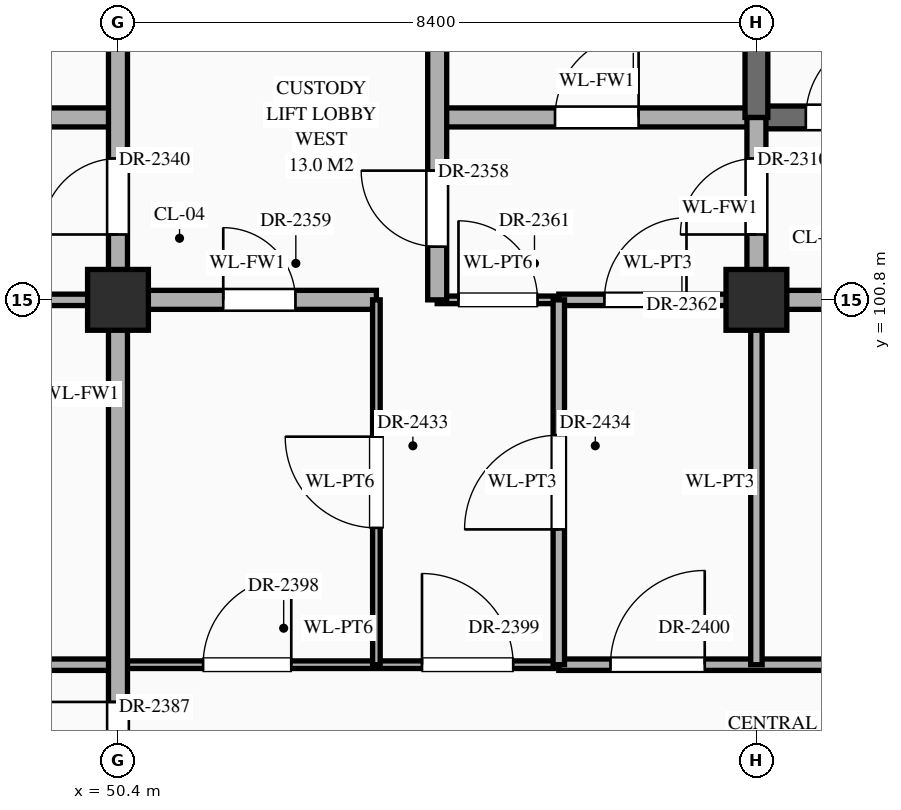
"""IFC4 building model, lengths in metres.
Left out: names, types, materials, properties, quantities, classifications, styles, units other than length and angle.
Written with IfcOpenShell. Run it as: python <this file> out.ifc"""

import sys

from ifc_helpers import new_model, si_unit, direction, frame, frame_2d, origin, origin_2d, place, context, subcontext, project, spatial, rectangle, extrude, element, fill, save


model = new_model("IFC4")
c1 = context("Model", 3, precision=1e-05, world=origin(), true_north=direction((0.0, 1.0)))
c2 = subcontext(c1, "Body", "Model", "MODEL_VIEW")
j1 = project(units=[si_unit("LENGTHUNIT", "METRE"), si_unit("PLANEANGLEUNIT", "RADIAN")], contexts=[c1])
p1 = place(None, origin())
s1 = spatial("IfcSite", under=j1, at=p1, CompositionType="ELEMENT")
p2 = place(p1, origin())
s2 = spatial("IfcBuilding", under=s1, at=p2, CompositionType="ELEMENT")
p3 = place(p2, frame((0.0, 0.0, 30.6)))
s3 = spatial("IfcBuildingStorey", under=s2, at=p3, CompositionType="ELEMENT", Elevation=30.6)
for number, where, z_axis, x_axis in (
    (1, (50.4, 100.8, 0.0), (0.0, 0.0, 1.0), (1.0, 0.0, 0.0)),
    (2, (58.8, 100.8, 0.0), (0.0, 0.0, 1.0), (1.0, 0.0, 0.0)),
):
    element("IfcColumn", number, at=place(p3, frame(where, z_axis=z_axis, x_axis=x_axis)), inside=s3, PredefinedType="COLUMN", context=c2, shape_type="SweptSolid", body=[
        extrude(rectangle(XDim=0.8, YDim=0.8, at=origin_2d()), origin(), (0.0, 0.0, 1.0), 4.5),
    ])
p4 = place(p3, frame((31.0, 96.0, 0.0), z_axis=(0.0, 0.0, 1.0), x_axis=(1.0, 0.0, 0.0)))
e3 = element("IfcWall", 3, at=p4, inside=s3, PredefinedType="STANDARD", context=c2, shape_type="SweptSolid", body=[
    extrude(rectangle(XDim=19.4, YDim=0.15, at=frame_2d((9.7, 0.0))), origin(), (0.0, 0.0, 1.0), 4.15),
])
p5 = place(p4, frame((0.85, 0.0, 0.0)))
e4 = element("IfcOpeningElement", 4, at=p5, cuts=e3, PredefinedType="OPENING", context=c2, shape_type="SweptSolid", body=[
    extrude(rectangle(XDim=0.9, YDim=2.15, at=frame_2d((0.45, 1.075))), frame((0.0, 0.087, 0.0), z_axis=(0.0, -1.0, 0.0), x_axis=(1.0, 0.0, 0.0)), (0.0, 0.0, 1.0), 0.174),
])
p6 = place(p4, frame((6.37, 0.0, 0.0)))
e5 = element("IfcOpeningElement", 5, at=p6, cuts=e3, PredefinedType="OPENING", context=c2, shape_type="SweptSolid", body=[
    extrude(rectangle(XDim=0.86, YDim=2.1, at=frame_2d((0.43, 1.05))), frame((0.0, 0.087, 0.0), z_axis=(0.0, -1.0, 0.0), x_axis=(1.0, 0.0, 0.0)), (0.0, 0.0, 1.0), 0.174),
])
p7 = place(p4, frame((14.74, 0.0, 0.0)))
e6 = element("IfcOpeningElement", 6, at=p7, cuts=e3, PredefinedType="OPENING", context=c2, shape_type="SweptSolid", body=[
    extrude(rectangle(XDim=0.92, YDim=2.15, at=frame_2d((0.46, 1.075))), frame((0.0, 0.087, 0.0), z_axis=(0.0, -1.0, 0.0), x_axis=(1.0, 0.0, 0.0)), (0.0, 0.0, 1.0), 0.174),
])
p8 = place(p3, frame((50.4, 96.0, 0.0), z_axis=(0.0, 0.0, 1.0), x_axis=(1.0, 0.0, 0.0)))
e7 = element("IfcWall", 7, at=p8, inside=s3, PredefinedType="STANDARD", context=c2, shape_type="SweptSolid", body=[
    extrude(rectangle(XDim=5.8, YDim=0.1, at=frame_2d((2.9, 0.0))), origin(), (0.0, 0.0, 1.0), 4.24),
])
p9 = place(p8, frame((1.12, 0.0, 0.0)))
e8 = element("IfcOpeningElement", 8, at=p9, cuts=e7, PredefinedType="OPENING", context=c2, shape_type="SweptSolid", body=[
    extrude(rectangle(XDim=1.16, YDim=2.3, at=frame_2d((0.58, 1.15))), frame((0.0, 0.062, 0.0), z_axis=(0.0, -1.0, 0.0), x_axis=(1.0, 0.0, 0.0)), (0.0, 0.0, 1.0), 0.124),
])
p10 = place(p8, frame((4.0, 0.0, 0.0)))
e9 = element("IfcOpeningElement", 9, at=p10, cuts=e7, PredefinedType="OPENING", context=c2, shape_type="SweptSolid", body=[
    extrude(rectangle(XDim=1.2, YDim=2.35, at=frame_2d((0.6, 1.175))), frame((0.0, 0.062, 0.0), z_axis=(0.0, -1.0, 0.0), x_axis=(1.0, 0.0, 0.0)), (0.0, 0.0, 1.0), 0.124),
])
p11 = place(p3, frame((56.2, 96.0, 0.0), z_axis=(0.0, 0.0, 1.0), x_axis=(1.0, 0.0, 0.0)))
e10 = element("IfcWall", 10, at=p11, inside=s3, PredefinedType="STANDARD", context=c2, shape_type="SweptSolid", body=[
    extrude(rectangle(XDim=27.8, YDim=0.15, at=frame_2d((13.9, 0.0))), origin(), (0.0, 0.0, 1.0), 4.24),
])
p12 = place(p11, frame((0.68, 0.0, 0.0)))
e11 = element("IfcOpeningElement", 11, at=p12, cuts=e10, PredefinedType="OPENING", context=c2, shape_type="SweptSolid", body=[
    extrude(rectangle(XDim=1.24, YDim=2.3, at=frame_2d((0.62, 1.15))), frame((0.0, 0.087, 0.0), z_axis=(0.0, -1.0, 0.0), x_axis=(1.0, 0.0, 0.0)), (0.0, 0.0, 1.0), 0.174),
])
p13 = place(p11, frame((6.16, 0.0, 0.0)))
e12 = element("IfcOpeningElement", 12, at=p13, cuts=e10, PredefinedType="OPENING", context=c2, shape_type="SweptSolid", body=[
    extrude(rectangle(XDim=1.28, YDim=2.35, at=frame_2d((0.64, 1.175))), frame((0.0, 0.087, 0.0), z_axis=(0.0, -1.0, 0.0), x_axis=(1.0, 0.0, 0.0)), (0.0, 0.0, 1.0), 0.174),
])
p14 = place(p11, frame((14.73, 0.0, 0.0)))
e13 = element("IfcOpeningElement", 13, at=p14, cuts=e10, PredefinedType="OPENING", context=c2, shape_type="SweptSolid", body=[
    extrude(rectangle(XDim=0.94, YDim=2.3, at=frame_2d((0.47, 1.15))), frame((0.0, 0.087, 0.0), z_axis=(0.0, -1.0, 0.0), x_axis=(1.0, 0.0, 0.0)), (0.0, 0.0, 1.0), 0.174),
])
p15 = place(p11, frame((23.11, 0.0, 0.0)))
e14 = element("IfcOpeningElement", 14, at=p15, cuts=e10, PredefinedType="OPENING", context=c2, shape_type="SweptSolid", body=[
    extrude(rectangle(XDim=0.98, YDim=2.35, at=frame_2d((0.49, 1.175))), frame((0.0, 0.087, 0.0), z_axis=(0.0, -1.0, 0.0), x_axis=(1.0, 0.0, 0.0)), (0.0, 0.0, 1.0), 0.174),
])
p16 = place(p3, frame((46.2, 100.8, 0.0), z_axis=(0.0, 0.0, 1.0), x_axis=(1.0, 0.0, 0.0)))
e15 = element("IfcWall", 15, at=p16, inside=s3, PredefinedType="STANDARD", context=c2, shape_type="SweptSolid", body=[
    extrude(rectangle(XDim=4.2, YDim=0.15, at=frame_2d((2.1, 0.0))), origin(), (0.0, 0.0, 1.0), 3.39),
])
p17 = place(p16, frame((1.48, 0.0, 0.0)))
e16 = element("IfcOpeningElement", 16, at=p17, cuts=e15, PredefinedType="OPENING", context=c2, shape_type="SweptSolid", body=[
    extrude(rectangle(XDim=0.92, YDim=2.15, at=frame_2d((0.46, 1.075))), frame((0.0, 0.087, 0.0), z_axis=(0.0, -1.0, 0.0), x_axis=(1.0, 0.0, 0.0)), (0.0, 0.0, 1.0), 0.174),
])
p18 = place(p3, frame((50.4, 100.8, 0.0), z_axis=(0.0, 0.0, 1.0), x_axis=(1.0, 0.0, 0.0)))
e17 = element("IfcWall", 17, at=p18, inside=s3, PredefinedType="STANDARD", context=c2, shape_type="SweptSolid", body=[
    extrude(rectangle(XDim=3.4, YDim=0.25, at=frame_2d((1.7, 0.0))), origin(), (0.0, 0.0, 1.0), 3.39),
])
p19 = place(p18, frame((1.385, 0.0, 0.0)))
e18 = element("IfcOpeningElement", 18, at=p19, cuts=e17, PredefinedType="OPENING", context=c2, shape_type="SweptSolid", body=[
    extrude(rectangle(XDim=0.95, YDim=2.15, at=frame_2d((0.475, 1.075))), frame((0.0, 0.137, 0.0), z_axis=(0.0, -1.0, 0.0), x_axis=(1.0, 0.0, 0.0)), (0.0, 0.0, 1.0), 0.274),
])
p20 = place(p3, frame((54.6, 100.8, 0.0), z_axis=(0.0, 0.0, 1.0), x_axis=(1.0, 0.0, 0.0)))
e19 = element("IfcWall", 19, at=p20, inside=s3, PredefinedType="STANDARD", context=c2, shape_type="SweptSolid", body=[
    extrude(rectangle(XDim=1.6, YDim=0.1, at=frame_2d((0.8, 0.0))), origin(), (0.0, 0.0, 1.0), 3.39),
])
p21 = place(p20, frame((0.28, 0.0, 0.0)))
e20 = element("IfcOpeningElement", 20, at=p21, cuts=e19, PredefinedType="OPENING", context=c2, shape_type="SweptSolid", body=[
    extrude(rectangle(XDim=1.04, YDim=2.2, at=frame_2d((0.52, 1.1))), frame((0.0, 0.062, 0.0), z_axis=(0.0, -1.0, 0.0), x_axis=(1.0, 0.0, 0.0)), (0.0, 0.0, 1.0), 0.124),
])
p22 = place(p3, frame((56.2, 100.8, 0.0), z_axis=(0.0, 0.0, 1.0), x_axis=(1.0, 0.0, 0.0)))
e21 = element("IfcWall", 21, at=p22, inside=s3, PredefinedType="STANDARD", context=c2, shape_type="SweptSolid", body=[
    extrude(rectangle(XDim=2.6, YDim=0.15, at=frame_2d((1.3, 0.0))), origin(), (0.0, 0.0, 1.0), 3.39),
])
p23 = place(p22, frame((0.6, 0.0, 0.0)))
e22 = element("IfcOpeningElement", 22, at=p23, cuts=e21, PredefinedType="OPENING", context=c2, shape_type="SweptSolid", body=[
    extrude(rectangle(XDim=1.08, YDim=2.25, at=frame_2d((0.54, 1.125))), frame((0.0, 0.087, 0.0), z_axis=(0.0, -1.0, 0.0), x_axis=(1.0, 0.0, 0.0)), (0.0, 0.0, 1.0), 0.174),
])
p24 = place(p3, frame((58.8, 100.8, 0.0), z_axis=(0.0, 0.0, 1.0), x_axis=(1.0, 0.0, 0.0)))
e23 = element("IfcWall", 23, at=p24, inside=s3, PredefinedType="STANDARD", context=c2, shape_type="SweptSolid", body=[
    extrude(rectangle(XDim=12.6, YDim=0.25, at=frame_2d((6.3, 0.0))), origin(), (0.0, 0.0, 1.0), 3.39),
])
p25 = place(p24, frame((3.725, 0.0, 0.0)))
e24 = element("IfcOpeningElement", 24, at=p25, cuts=e23, PredefinedType="OPENING", context=c2, shape_type="SweptSolid", body=[
    extrude(rectangle(XDim=0.95, YDim=2.15, at=frame_2d((0.475, 1.075))), frame((0.0, 0.137, 0.0), z_axis=(0.0, -1.0, 0.0), x_axis=(1.0, 0.0, 0.0)), (0.0, 0.0, 1.0), 0.274),
])
p26 = place(p3, frame((46.2, 103.2, 0.0), z_axis=(0.0, 0.0, 1.0), x_axis=(1.0, 0.0, 0.0)))
e25 = element("IfcWall", 25, at=p26, inside=s3, PredefinedType="STANDARD", context=c2, shape_type="SweptSolid", body=[
    extrude(rectangle(XDim=4.2, YDim=0.25, at=frame_2d((2.1, 0.0))), origin(), (0.0, 0.0, 1.0), 4.24),
])
p27 = place(p26, frame((1.55, 0.0, 0.0)))
e26 = element("IfcOpeningElement", 26, at=p27, cuts=e25, PredefinedType="OPENING", context=c2, shape_type="SweptSolid", body=[
    extrude(rectangle(XDim=1.1, YDim=2.2, at=frame_2d((0.55, 1.1))), frame((0.0, 0.137, 0.0), z_axis=(0.0, -1.0, 0.0), x_axis=(1.0, 0.0, 0.0)), (0.0, 0.0, 1.0), 0.274),
])
p28 = place(p3, frame((54.6, 103.2, 0.0), z_axis=(0.0, 0.0, 1.0), x_axis=(1.0, 0.0, 0.0)))
e27 = element("IfcWall", 27, at=p28, inside=s3, PredefinedType="STANDARD", context=c2, shape_type="SweptSolid", body=[
    extrude(rectangle(XDim=4.2, YDim=0.25, at=frame_2d((2.1, 0.0))), origin(), (0.0, 0.0, 1.0), 4.24),
])
p29 = place(p28, frame((1.55, 0.0, 0.0)))
e28 = element("IfcOpeningElement", 28, at=p29, cuts=e27, PredefinedType="OPENING", context=c2, shape_type="SweptSolid", body=[
    extrude(rectangle(XDim=1.1, YDim=2.2, at=frame_2d((0.55, 1.1))), frame((0.0, 0.137, 0.0), z_axis=(0.0, -1.0, 0.0), x_axis=(1.0, 0.0, 0.0)), (0.0, 0.0, 1.0), 0.274),
])
p30 = place(p3, frame((58.8, 103.2, 0.0), z_axis=(0.0, 0.0, 1.0), x_axis=(1.0, 0.0, 0.0)))
e29 = element("IfcWall", 29, at=p30, inside=s3, PredefinedType="SHEAR", context=c2, shape_type="SweptSolid", body=[
    extrude(rectangle(XDim=8.4, YDim=0.3, at=frame_2d((4.2, 0.0))), origin(), (0.0, 0.0, 1.0), 4.24),
])
p31 = place(p30, frame((0.65, 0.0, 0.0)))
e30 = element("IfcOpeningElement", 30, at=p31, cuts=e29, PredefinedType="OPENING", context=c2, shape_type="SweptSolid", body=[
    extrude(rectangle(XDim=1.1, YDim=2.2, at=frame_2d((0.55, 1.1))), frame((0.0, 0.162, 0.0), z_axis=(0.0, -1.0, 0.0), x_axis=(1.0, 0.0, 0.0)), (0.0, 0.0, 1.0), 0.324),
])
p32 = place(p3, frame((50.4, 91.2, 0.0), z_axis=(0.0, 0.0, 1.0), x_axis=(0.0, 1.0, 0.0)))
e31 = element("IfcWall", 31, at=p32, inside=s3, PredefinedType="STANDARD", context=c2, shape_type="SweptSolid", body=[
    extrude(rectangle(XDim=13.2, YDim=0.25, at=frame_2d((6.6, 0.0))), origin(), (0.0, 0.0, 1.0), 3.49),
])
p33 = place(p32, frame((0.565, 0.0, 0.0)))
e32 = element("IfcOpeningElement", 32, at=p33, cuts=e31, PredefinedType="OPENING", context=c2, shape_type="SweptSolid", body=[
    extrude(rectangle(XDim=0.95, YDim=2.15, at=frame_2d((0.475, 1.075))), frame((0.0, 0.137, 0.0), z_axis=(0.0, -1.0, 0.0), x_axis=(1.0, 0.0, 0.0)), (0.0, 0.0, 1.0), 0.274),
])
p34 = place(p32, frame((10.46, 0.0, 0.0)))
e33 = element("IfcOpeningElement", 33, at=p34, cuts=e31, PredefinedType="OPENING", context=c2, shape_type="SweptSolid", body=[
    extrude(rectangle(XDim=1.0, YDim=2.2, at=frame_2d((0.5, 1.1))), frame((0.0, 0.137, 0.0), z_axis=(0.0, -1.0, 0.0), x_axis=(1.0, 0.0, 0.0)), (0.0, 0.0, 1.0), 0.274),
])
p35 = place(p32, frame((3.21, 0.0, 0.0)))
e34 = element("IfcOpeningElement", 34, at=p35, cuts=e31, PredefinedType="OPENING", context=c2, shape_type="SweptSolid", body=[
    extrude(rectangle(XDim=1.1, YDim=2.2, at=frame_2d((0.55, 1.1))), frame((0.0, 0.137, 0.0), z_axis=(0.0, -1.0, 0.0), x_axis=(1.0, 0.0, 0.0)), (0.0, 0.0, 1.0), 0.274),
])
p36 = place(p3, frame((53.8, 96.0, 0.0), z_axis=(0.0, 0.0, 1.0), x_axis=(0.0, 1.0, 0.0)))
e35 = element("IfcWall", 35, at=p36, inside=s3, PredefinedType="STANDARD", context=c2, shape_type="SweptSolid", body=[
    extrude(rectangle(XDim=4.8, YDim=0.1, at=frame_2d((2.4, 0.0))), origin(), (0.0, 0.0, 1.0), 4.24),
])
p37 = place(p36, frame((1.8, 0.0, 0.0)))
e36 = element("IfcOpeningElement", 36, at=p37, cuts=e35, PredefinedType="OPENING", context=c2, shape_type="SweptSolid", body=[
    extrude(rectangle(XDim=1.2, YDim=2.35, at=frame_2d((0.6, 1.175))), frame((0.0, 0.062, 0.0), z_axis=(0.0, -1.0, 0.0), x_axis=(1.0, 0.0, 0.0)), (0.0, 0.0, 1.0), 0.124),
])
p38 = place(p3, frame((54.6, 100.8, 0.0), z_axis=(0.0, 0.0, 1.0), x_axis=(0.0, 1.0, 0.0)))
e37 = element("IfcWall", 37, at=p38, inside=s3, PredefinedType="STANDARD", context=c2, shape_type="SweptSolid", body=[
    extrude(rectangle(XDim=3.6, YDim=0.25, at=frame_2d((1.8, 0.0))), origin(), (0.0, 0.0, 1.0), 3.94),
])
p39 = place(p38, frame((0.7, 0.0, 0.0)))
e38 = element("IfcOpeningElement", 38, at=p39, cuts=e37, PredefinedType="OPENING", context=c2, shape_type="SweptSolid", body=[
    extrude(rectangle(XDim=1.0, YDim=2.2, at=frame_2d((0.5, 1.1))), frame((0.0, 0.137, 0.0), z_axis=(0.0, -1.0, 0.0), x_axis=(1.0, 0.0, 0.0)), (0.0, 0.0, 1.0), 0.274),
])
p40 = place(p3, frame((56.2, 96.0, 0.0), z_axis=(0.0, 0.0, 1.0), x_axis=(0.0, 1.0, 0.0)))
e39 = element("IfcWall", 39, at=p40, inside=s3, PredefinedType="STANDARD", context=c2, shape_type="SweptSolid", body=[
    extrude(rectangle(XDim=4.8, YDim=0.15, at=frame_2d((2.4, 0.0))), origin(), (0.0, 0.0, 1.0), 4.24),
])
p41 = place(p40, frame((1.78, 0.0, 0.0)))
e40 = element("IfcOpeningElement", 40, at=p41, cuts=e39, PredefinedType="OPENING", context=c2, shape_type="SweptSolid", body=[
    extrude(rectangle(XDim=1.24, YDim=2.3, at=frame_2d((0.62, 1.15))), frame((0.0, 0.087, 0.0), z_axis=(0.0, -1.0, 0.0), x_axis=(1.0, 0.0, 0.0)), (0.0, 0.0, 1.0), 0.174),
])
p42 = place(p3, frame((58.8, 96.0, 0.0), z_axis=(0.0, 0.0, 1.0), x_axis=(0.0, 1.0, 0.0)))
e41 = element("IfcWall", 41, at=p42, inside=s3, PredefinedType="STANDARD", context=c2, shape_type="SweptSolid", body=[
    extrude(rectangle(XDim=4.8, YDim=0.15, at=frame_2d((2.4, 0.0))), origin(), (0.0, 0.0, 1.0), 3.49),
])
p43 = place(p3, frame((58.8, 100.8, 0.0), z_axis=(0.0, 0.0, 1.0), x_axis=(0.0, 1.0, 0.0)))
e42 = element("IfcWall", 42, at=p43, inside=s3, PredefinedType="STANDARD", context=c2, shape_type="SweptSolid", body=[
    extrude(rectangle(XDim=2.4, YDim=0.25, at=frame_2d((1.2, 0.0))), origin(), (0.0, 0.0, 1.0), 3.49),
])
p44 = place(p43, frame((0.86, 0.0, 0.0)))
e43 = element("IfcOpeningElement", 43, at=p44, cuts=e42, PredefinedType="OPENING", context=c2, shape_type="SweptSolid", body=[
    extrude(rectangle(XDim=1.0, YDim=2.2, at=frame_2d((0.5, 1.1))), frame((0.0, 0.137, 0.0), z_axis=(0.0, -1.0, 0.0), x_axis=(1.0, 0.0, 0.0)), (0.0, 0.0, 1.0), 0.274),
])
p45 = place(p3, frame((58.8, 103.2, 0.0), z_axis=(0.0, 0.0, 1.0), x_axis=(0.0, 1.0, 0.0)))
e44 = element("IfcWall", 44, at=p45, inside=s3, PredefinedType="SHEAR", context=c2, shape_type="SweptSolid", body=[
    extrude(rectangle(XDim=4.8, YDim=0.3, at=frame_2d((2.4, 0.0))), origin(), (0.0, 0.0, 1.0), 4.24),
])
p46 = place(p31, origin())
e45 = element("IfcDoor", 45, at=p46, inside=s3, OperationType="SINGLE_SWING_RIGHT", PredefinedType="DOOR", context=c2, shape_type="SweptSolid", body=[
    extrude(rectangle(XDim=1.1, YDim=2.2, at=frame_2d((0.55, 1.1))), frame((0.0, 0.025, 0.0), z_axis=(0.0, -1.0, 0.0), x_axis=(1.0, 0.0, 0.0)), (0.0, 0.0, 1.0), 0.05),
])
fill(e30, e45)
p47 = place(p44, origin())
e46 = element("IfcDoor", 46, at=p47, inside=s3, OperationType="SINGLE_SWING_LEFT", PredefinedType="DOOR", context=c2, shape_type="SweptSolid", body=[
    extrude(rectangle(XDim=1.0, YDim=2.2, at=frame_2d((0.5, 1.1))), frame((0.0, 0.025, 0.0), z_axis=(0.0, -1.0, 0.0), x_axis=(1.0, 0.0, 0.0)), (0.0, 0.0, 1.0), 0.05),
])
fill(e43, e46)
p48 = place(p34, origin())
e47 = element("IfcDoor", 47, at=p48, inside=s3, OperationType="SINGLE_SWING_LEFT", PredefinedType="DOOR", context=c2, shape_type="SweptSolid", body=[
    extrude(rectangle(XDim=1.0, YDim=2.2, at=frame_2d((0.5, 1.1))), frame((0.0, 0.025, 0.0), z_axis=(0.0, -1.0, 0.0), x_axis=(1.0, 0.0, 0.0)), (0.0, 0.0, 1.0), 0.05),
])
fill(e33, e47)
p49 = place(p39, origin())
e48 = element("IfcDoor", 48, at=p49, inside=s3, OperationType="SINGLE_SWING_RIGHT", PredefinedType="DOOR", context=c2, shape_type="SweptSolid", body=[
    extrude(rectangle(XDim=1.0, YDim=2.2, at=frame_2d((0.5, 1.1))), frame((0.0, 0.025, 0.0), z_axis=(0.0, -1.0, 0.0), x_axis=(1.0, 0.0, 0.0)), (0.0, 0.0, 1.0), 0.05),
])
fill(e38, e48)
p50 = place(p19, origin())
e49 = element("IfcDoor", 49, at=p50, inside=s3, OperationType="SINGLE_SWING_LEFT", PredefinedType="DOOR", context=c2, shape_type="SweptSolid", body=[
    extrude(rectangle(XDim=0.95, YDim=2.15, at=frame_2d((0.475, 1.075))), frame((0.0, 0.025, 0.0), z_axis=(0.0, -1.0, 0.0), x_axis=(1.0, 0.0, 0.0)), (0.0, 0.0, 1.0), 0.05),
])
fill(e18, e49)
p51 = place(p29, origin())
e50 = element("IfcDoor", 50, at=p51, inside=s3, OperationType="SINGLE_SWING_RIGHT", PredefinedType="DOOR", context=c2, shape_type="SweptSolid", body=[
    extrude(rectangle(XDim=1.1, YDim=2.2, at=frame_2d((0.55, 1.1))), frame((0.0, 0.025, 0.0), z_axis=(0.0, -1.0, 0.0), x_axis=(1.0, 0.0, 0.0)), (0.0, 0.0, 1.0), 0.05),
])
fill(e28, e50)
p52 = place(p21, origin())
e51 = element("IfcDoor", 51, at=p52, inside=s3, OperationType="SINGLE_SWING_LEFT", PredefinedType="DOOR", context=c2, shape_type="SweptSolid", body=[
    extrude(rectangle(XDim=1.04, YDim=2.2, at=frame_2d((0.52, 1.1))), frame((0.0, 0.025, 0.0), z_axis=(0.0, -1.0, 0.0), x_axis=(1.0, 0.0, 0.0)), (0.0, 0.0, 1.0), 0.05),
])
fill(e20, e51)
p53 = place(p23, origin())
e52 = element("IfcDoor", 52, at=p53, inside=s3, OperationType="SINGLE_SWING_RIGHT", PredefinedType="DOOR", context=c2, shape_type="SweptSolid", body=[
    extrude(rectangle(XDim=1.08, YDim=2.25, at=frame_2d((0.54, 1.125))), frame((0.0, 0.025, 0.0), z_axis=(0.0, -1.0, 0.0), x_axis=(1.0, 0.0, 0.0)), (0.0, 0.0, 1.0), 0.05),
])
fill(e22, e52)
p54 = place(p35, origin())
e53 = element("IfcDoor", 53, at=p54, inside=s3, OperationType="SINGLE_SWING_RIGHT", PredefinedType="DOOR", context=c2, shape_type="SweptSolid", body=[
    extrude(rectangle(XDim=1.1, YDim=2.2, at=frame_2d((0.55, 1.1))), frame((0.0, 0.025, 0.0), z_axis=(0.0, -1.0, 0.0), x_axis=(1.0, 0.0, 0.0)), (0.0, 0.0, 1.0), 0.05),
])
fill(e34, e53)
p55 = place(p9, origin())
e54 = element("IfcDoor", 54, at=p55, inside=s3, OperationType="SINGLE_SWING_RIGHT", PredefinedType="DOOR", context=c2, shape_type="SweptSolid", body=[
    extrude(rectangle(XDim=1.16, YDim=2.3, at=frame_2d((0.58, 1.15))), frame((0.0, 0.025, 0.0), z_axis=(0.0, -1.0, 0.0), x_axis=(1.0, 0.0, 0.0)), (0.0, 0.0, 1.0), 0.05),
])
fill(e8, e54)
p56 = place(p10, origin())
e55 = element("IfcDoor", 55, at=p56, inside=s3, OperationType="SINGLE_SWING_LEFT", PredefinedType="DOOR", context=c2, shape_type="SweptSolid", body=[
    extrude(rectangle(XDim=1.2, YDim=2.35, at=frame_2d((0.6, 1.175))), frame((0.0, 0.025, 0.0), z_axis=(0.0, -1.0, 0.0), x_axis=(1.0, 0.0, 0.0)), (0.0, 0.0, 1.0), 0.05),
])
fill(e9, e55)
p57 = place(p12, origin())
e56 = element("IfcDoor", 56, at=p57, inside=s3, OperationType="SINGLE_SWING_RIGHT", PredefinedType="DOOR", context=c2, shape_type="SweptSolid", body=[
    extrude(rectangle(XDim=1.24, YDim=2.3, at=frame_2d((0.62, 1.15))), frame((0.0, 0.025, 0.0), z_axis=(0.0, -1.0, 0.0), x_axis=(1.0, 0.0, 0.0)), (0.0, 0.0, 1.0), 0.05),
])
fill(e11, e56)
p58 = place(p37, origin())
e57 = element("IfcDoor", 57, at=p58, inside=s3, OperationType="SINGLE_SWING_RIGHT", PredefinedType="DOOR", context=c2, shape_type="SweptSolid", body=[
    extrude(rectangle(XDim=1.2, YDim=2.35, at=frame_2d((0.6, 1.175))), frame((0.0, 0.025, 0.0), z_axis=(0.0, -1.0, 0.0), x_axis=(1.0, 0.0, 0.0)), (0.0, 0.0, 1.0), 0.05),
])
fill(e36, e57)
p59 = place(p41, origin())
e58 = element("IfcDoor", 58, at=p59, inside=s3, OperationType="SINGLE_SWING_LEFT", PredefinedType="DOOR", context=c2, shape_type="SweptSolid", body=[
    extrude(rectangle(XDim=1.24, YDim=2.3, at=frame_2d((0.62, 1.15))), frame((0.0, 0.025, 0.0), z_axis=(0.0, -1.0, 0.0), x_axis=(1.0, 0.0, 0.0)), (0.0, 0.0, 1.0), 0.05),
])
fill(e40, e58)
save(model, sys.argv[1])
